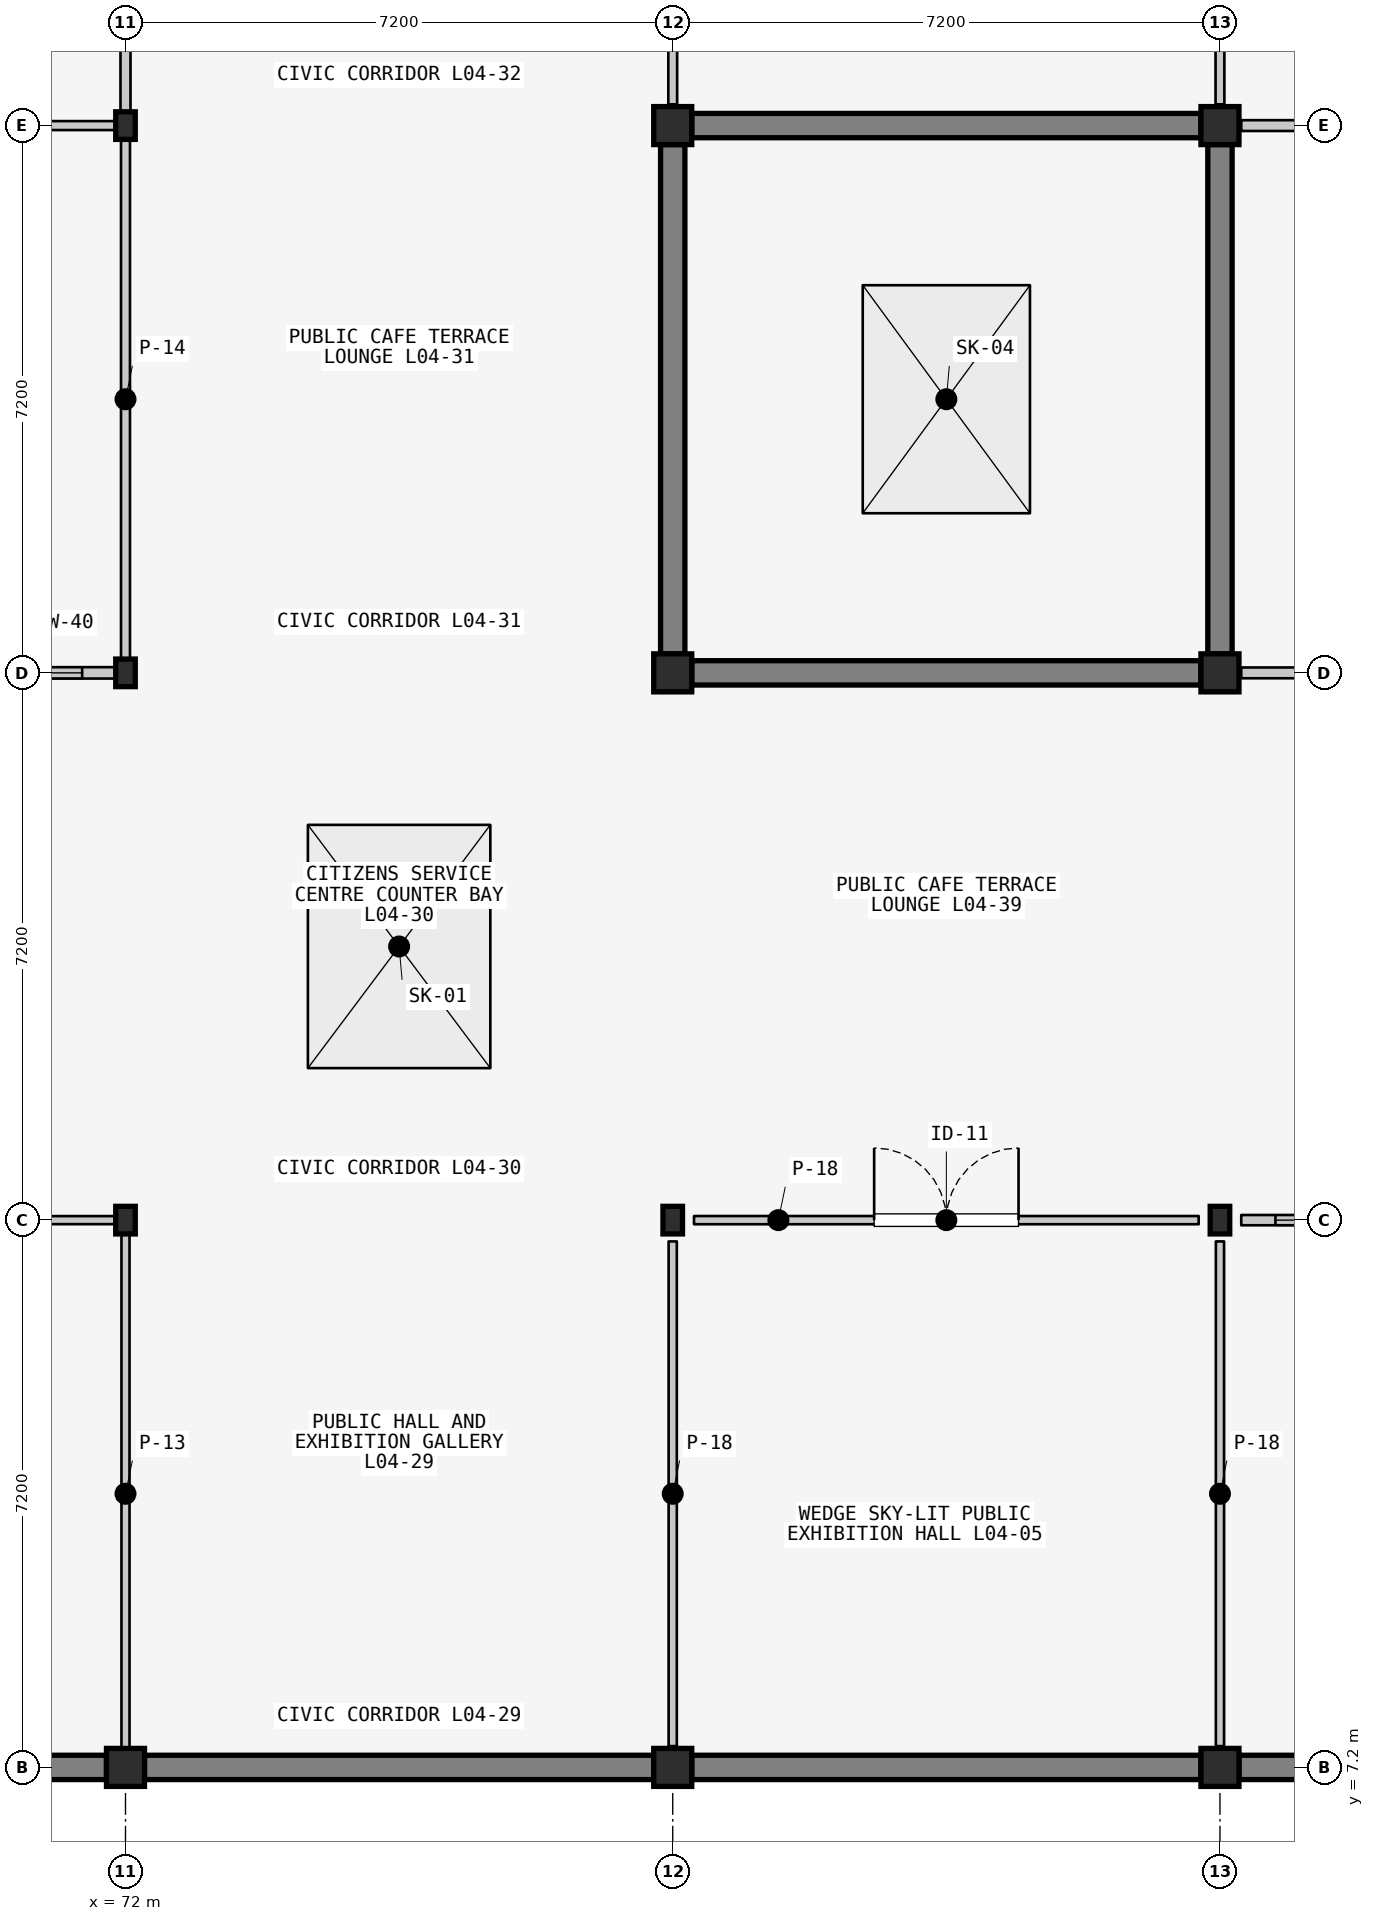
"""IFC4 building model, lengths in metres.
Left out: names, types, materials, properties, quantities, classifications, styles, units other than length and angle.
Written with IfcOpenShell. Run it as: python <this file> out.ifc"""

import sys

from ifc_helpers import new_model, si_unit, direction, frame, frame_2d, origin, origin_2d, place, context, subcontext, project, spatial, rectangle, i_section, extrude, element, fill, save


model = new_model("IFC4")
c1 = context("Model", 3, precision=1e-05, world=origin(), true_north=direction((0.0, 1.0)))
c2 = subcontext(c1, "Body", "Model", "MODEL_VIEW")
j1 = project(units=[si_unit("LENGTHUNIT", "METRE"), si_unit("PLANEANGLEUNIT", "RADIAN")], contexts=[c1])
p1 = place(None, origin())
s1 = spatial("IfcSite", under=j1, at=p1, CompositionType="ELEMENT")
p2 = place(p1, origin())
s2 = spatial("IfcBuilding", under=s1, at=p2, CompositionType="ELEMENT")
p3 = place(p2, frame((0.0, 0.0, 14.1)))
s3 = spatial("IfcBuildingStorey", under=s2, at=p3, CompositionType="ELEMENT", Elevation=14.1)
p4 = place(p3, frame((72.0, 7.2, 0.0), z_axis=(0.0, 0.0, 1.0), x_axis=(1.0, 0.0, 0.0)))
e1 = element("IfcColumn", 1, at=p4, inside=s3, PredefinedType="COLUMN", context=c2, shape_type="SweptSolid", body=[
    extrude(rectangle(XDim=0.5, YDim=0.5, at=origin_2d()), origin(), (0.0, 0.0, 1.0), 4.905),
])
p5 = place(p3, frame((72.0, 14.4, 0.0), z_axis=(0.0, 0.0, 1.0), x_axis=(1.0, 0.0, 0.0)))
e2 = element("IfcColumn", 2, at=p5, inside=s3, PredefinedType="COLUMN", context=c2, shape_type="SweptSolid", body=[
    extrude(i_section(OverallWidth=0.257, OverallDepth=0.363, WebThickness=0.013, FlangeThickness=0.022, FilletRadius=0.015, at=origin_2d()), origin(), (0.0, 0.0, 1.0), 6.248),
])
p6 = place(p3, frame((72.0, 21.6, 0.0), z_axis=(0.0, 0.0, 1.0), x_axis=(1.0, 0.0, 0.0)))
e3 = element("IfcColumn", 3, at=p6, inside=s3, PredefinedType="COLUMN", context=c2, shape_type="SweptSolid", body=[
    extrude(i_section(OverallWidth=0.257, OverallDepth=0.363, WebThickness=0.013, FlangeThickness=0.022, FilletRadius=0.015, at=origin_2d()), origin(), (0.0, 0.0, 1.0), 7.59),
])
p7 = place(p3, frame((72.0, 28.8, 0.0), z_axis=(0.0, 0.0, 1.0), x_axis=(1.0, 0.0, 0.0)))
e4 = element("IfcColumn", 4, at=p7, inside=s3, PredefinedType="COLUMN", context=c2, shape_type="SweptSolid", body=[
    extrude(i_section(OverallWidth=0.257, OverallDepth=0.363, WebThickness=0.013, FlangeThickness=0.022, FilletRadius=0.015, at=origin_2d()), origin(), (0.0, 0.0, 1.0), 8.933),
])
p8 = place(p3, frame((79.2, 7.2, 0.0), z_axis=(0.0, 0.0, 1.0), x_axis=(1.0, 0.0, 0.0)))
e5 = element("IfcColumn", 5, at=p8, inside=s3, PredefinedType="COLUMN", context=c2, shape_type="SweptSolid", body=[
    extrude(rectangle(XDim=0.5, YDim=0.5, at=origin_2d()), origin(), (0.0, 0.0, 1.0), 4.933),
])
p9 = place(p3, frame((79.2, 14.4, 0.0), z_axis=(0.0, 0.0, 1.0), x_axis=(1.0, 0.0, 0.0)))
e6 = element("IfcColumn", 6, at=p9, inside=s3, PredefinedType="COLUMN", context=c2, shape_type="SweptSolid", body=[
    extrude(i_section(OverallWidth=0.257, OverallDepth=0.363, WebThickness=0.013, FlangeThickness=0.022, FilletRadius=0.015, at=origin_2d()), origin(), (0.0, 0.0, 1.0), 6.276),
])
p10 = place(p3, frame((79.2, 21.6, 0.0), z_axis=(0.0, 0.0, 1.0), x_axis=(1.0, 0.0, 0.0)))
e7 = element("IfcColumn", 7, at=p10, inside=s3, PredefinedType="COLUMN", context=c2, shape_type="SweptSolid", body=[
    extrude(rectangle(XDim=0.5, YDim=0.5, at=origin_2d()), origin(), (0.0, 0.0, 1.0), 7.619),
])
p11 = place(p3, frame((79.2, 28.8, 0.0), z_axis=(0.0, 0.0, 1.0), x_axis=(1.0, 0.0, 0.0)))
e8 = element("IfcColumn", 8, at=p11, inside=s3, PredefinedType="COLUMN", context=c2, shape_type="SweptSolid", body=[
    extrude(rectangle(XDim=0.5, YDim=0.5, at=origin_2d()), origin(), (0.0, 0.0, 1.0), 8.962),
])
p12 = place(p3, frame((86.4, 7.2, 0.0), z_axis=(0.0, 0.0, 1.0), x_axis=(1.0, 0.0, 0.0)))
e9 = element("IfcColumn", 9, at=p12, inside=s3, PredefinedType="COLUMN", context=c2, shape_type="SweptSolid", body=[
    extrude(rectangle(XDim=0.5, YDim=0.5, at=origin_2d()), origin(), (0.0, 0.0, 1.0), 4.962),
])
p13 = place(p3, frame((86.4, 14.4, 0.0), z_axis=(0.0, 0.0, 1.0), x_axis=(1.0, 0.0, 0.0)))
e10 = element("IfcColumn", 10, at=p13, inside=s3, PredefinedType="COLUMN", context=c2, shape_type="SweptSolid", body=[
    extrude(i_section(OverallWidth=0.257, OverallDepth=0.363, WebThickness=0.013, FlangeThickness=0.022, FilletRadius=0.015, at=origin_2d()), origin(), (0.0, 0.0, 1.0), 6.305),
])
p14 = place(p3, frame((86.4, 21.6, 0.0), z_axis=(0.0, 0.0, 1.0), x_axis=(1.0, 0.0, 0.0)))
e11 = element("IfcColumn", 11, at=p14, inside=s3, PredefinedType="COLUMN", context=c2, shape_type="SweptSolid", body=[
    extrude(rectangle(XDim=0.5, YDim=0.5, at=origin_2d()), origin(), (0.0, 0.0, 1.0), 7.647),
])
p15 = place(p3, frame((86.4, 28.8, 0.0), z_axis=(0.0, 0.0, 1.0), x_axis=(1.0, 0.0, 0.0)))
e12 = element("IfcColumn", 12, at=p15, inside=s3, PredefinedType="COLUMN", context=c2, shape_type="SweptSolid", body=[
    extrude(rectangle(XDim=0.5, YDim=0.5, at=origin_2d()), origin(), (0.0, 0.0, 1.0), 8.99),
])
p16 = place(p3, frame((71.75, 7.2, 0.0), z_axis=(0.0, 0.0, 1.0), x_axis=(-1.0, 0.0, 0.0)))
e13 = element("IfcWall", 13, at=p16, inside=s3, PredefinedType="SOLIDWALL", context=c2, shape_type="SweptSolid", body=[
    extrude(rectangle(XDim=6.7, YDim=0.32, at=frame_2d((3.35, 0.0))), origin(), (0.0, 0.0, 1.0), 4.149),
])
p17 = place(p3, frame((78.95, 7.2, 0.0), z_axis=(0.0, 0.0, 1.0), x_axis=(-1.0, 0.0, 0.0)))
e14 = element("IfcWall", 14, at=p17, inside=s3, PredefinedType="SOLIDWALL", context=c2, shape_type="SweptSolid", body=[
    extrude(rectangle(XDim=6.7, YDim=0.32, at=frame_2d((3.35, 0.0))), origin(), (0.0, 0.0, 1.0), 4.177),
])
p18 = place(p3, frame((79.2, 28.55, 0.0), z_axis=(0.0, 0.0, 1.0), x_axis=(0.0, -1.0, 0.0)))
e15 = element("IfcWall", 15, at=p18, inside=s3, PredefinedType="SOLIDWALL", context=c2, shape_type="SweptSolid", body=[
    extrude(rectangle(XDim=6.7, YDim=0.32, at=frame_2d((3.35, 0.0))), origin(), (0.0, 0.0, 1.0), 6.936),
])
p19 = place(p3, frame((86.15, 7.2, 0.0), z_axis=(0.0, 0.0, 1.0), x_axis=(-1.0, 0.0, 0.0)))
e16 = element("IfcWall", 16, at=p19, inside=s3, PredefinedType="SOLIDWALL", context=c2, shape_type="SweptSolid", body=[
    extrude(rectangle(XDim=6.7, YDim=0.32, at=frame_2d((3.35, 0.0))), origin(), (0.0, 0.0, 1.0), 4.206),
])
p20 = place(p3, frame((79.45, 21.6, 0.0), z_axis=(0.0, 0.0, 1.0), x_axis=(1.0, 0.0, 0.0)))
e17 = element("IfcWall", 17, at=p20, inside=s3, PredefinedType="SOLIDWALL", context=c2, shape_type="SweptSolid", body=[
    extrude(rectangle(XDim=6.7, YDim=0.32, at=frame_2d((3.35, 0.0))), origin(), (0.0, 0.0, 1.0), 6.892),
])
p21 = place(p3, frame((86.15, 28.8, 0.0), z_axis=(0.0, 0.0, 1.0), x_axis=(-1.0, 0.0, 0.0)))
e18 = element("IfcWall", 18, at=p21, inside=s3, PredefinedType="SOLIDWALL", context=c2, shape_type="SweptSolid", body=[
    extrude(rectangle(XDim=6.7, YDim=0.32, at=frame_2d((3.35, 0.0))), origin(), (0.0, 0.0, 1.0), 8.235),
])
p22 = place(p3, frame((93.35, 7.2, 0.0), z_axis=(0.0, 0.0, 1.0), x_axis=(-1.0, 0.0, 0.0)))
e19 = element("IfcWall", 19, at=p22, inside=s3, PredefinedType="SOLIDWALL", context=c2, shape_type="SweptSolid", body=[
    extrude(rectangle(XDim=6.7, YDim=0.32, at=frame_2d((3.35, 0.0))), origin(), (0.0, 0.0, 1.0), 4.235),
])
p23 = place(p22, frame((0.908, 0.0, 0.95)))
e20 = element("IfcOpeningElement", 20, at=p23, cuts=e19, PredefinedType="OPENING", context=c2, shape_type="SweptSolid", body=[
    extrude(rectangle(XDim=1.4, YDim=2.1, at=frame_2d((0.7, 1.05))), frame((0.0, 0.17, 0.0), z_axis=(0.0, -1.0, 0.0), x_axis=(1.0, 0.0, 0.0)), (0.0, 0.0, 1.0), 0.34),
])
p24 = place(p22, frame((4.392, 0.0, 0.95)))
e21 = element("IfcOpeningElement", 21, at=p24, cuts=e19, PredefinedType="OPENING", context=c2, shape_type="SweptSolid", body=[
    extrude(rectangle(XDim=1.4, YDim=2.1, at=frame_2d((0.7, 1.05))), frame((0.0, 0.17, 0.0), z_axis=(0.0, -1.0, 0.0), x_axis=(1.0, 0.0, 0.0)), (0.0, 0.0, 1.0), 0.34),
])
p25 = place(p3, frame((86.4, 21.85, 0.0), z_axis=(0.0, 0.0, 1.0), x_axis=(0.0, 1.0, 0.0)))
e22 = element("IfcWall", 22, at=p25, inside=s3, PredefinedType="SOLIDWALL", context=c2, shape_type="SweptSolid", body=[
    extrude(rectangle(XDim=6.7, YDim=0.32, at=frame_2d((3.35, 0.0))), origin(), (0.0, 0.0, 1.0), 6.965),
])
p26 = place(p3, frame((64.92, 14.4, 0.0), z_axis=(0.0, 0.0, 1.0), x_axis=(1.0, 0.0, 0.0)))
e23 = element("IfcWall", 23, at=p26, inside=s3, PredefinedType="PARTITIONING", context=c2, shape_type="SweptSolid", body=[
    extrude(rectangle(XDim=6.96, YDim=0.106, at=frame_2d((3.48, 0.0))), origin(), (0.0, 0.0, 1.0), 3.72),
])
p27 = place(p26, frame((2.53, 0.0, 0.0)))
e24 = element("IfcOpeningElement", 24, at=p27, cuts=e23, PredefinedType="OPENING", context=c2, shape_type="SweptSolid", body=[
    extrude(rectangle(XDim=1.9, YDim=2.45, at=frame_2d((0.95, 1.225))), frame((0.0, 0.063, 0.0), z_axis=(0.0, -1.0, 0.0), x_axis=(1.0, 0.0, 0.0)), (0.0, 0.0, 1.0), 0.126),
])
p28 = place(p26, frame((0.45, 0.0, 1.05)))
e25 = element("IfcOpeningElement", 25, at=p28, cuts=e23, PredefinedType="OPENING", context=c2, shape_type="SweptSolid", body=[
    extrude(rectangle(XDim=1.36, YDim=1.1, at=frame_2d((0.68, 0.55))), frame((0.0, 0.063, 0.0), z_axis=(0.0, -1.0, 0.0), x_axis=(1.0, 0.0, 0.0)), (0.0, 0.0, 1.0), 0.126),
])
p29 = place(p3, frame((72.0, 14.28, 0.0), z_axis=(0.0, 0.0, 1.0), x_axis=(0.0, -1.0, 0.0)))
e26 = element("IfcWall", 26, at=p29, inside=s3, PredefinedType="PARTITIONING", context=c2, shape_type="SweptSolid", body=[
    extrude(rectangle(XDim=6.96, YDim=0.106, at=frame_2d((3.48, 0.0))), origin(), (0.0, 0.0, 1.0), 3.72),
])
p30 = place(p3, frame((71.88, 21.6, 0.0), z_axis=(0.0, 0.0, 1.0), x_axis=(-1.0, 0.0, 0.0)))
e27 = element("IfcWall", 27, at=p30, inside=s3, PredefinedType="PARTITIONING", context=c2, shape_type="SweptSolid", body=[
    extrude(rectangle(XDim=6.96, YDim=0.15, at=frame_2d((3.48, 0.0))), origin(), (0.0, 0.0, 1.0), 3.72),
])
p31 = place(p30, frame((2.655, 0.0, 0.0)))
e28 = element("IfcOpeningElement", 28, at=p31, cuts=e27, PredefinedType="OPENING", context=c2, shape_type="SweptSolid", body=[
    extrude(rectangle(XDim=1.65, YDim=2.35, at=frame_2d((0.825, 1.175))), frame((0.0, 0.085, 0.0), z_axis=(0.0, -1.0, 0.0), x_axis=(1.0, 0.0, 0.0)), (0.0, 0.0, 1.0), 0.17),
])
p32 = place(p30, frame((0.45, 0.0, 1.05)))
e29 = element("IfcOpeningElement", 29, at=p32, cuts=e27, PredefinedType="OPENING", context=c2, shape_type="SweptSolid", body=[
    extrude(rectangle(XDim=1.48, YDim=1.34, at=frame_2d((0.74, 0.67))), frame((0.0, 0.085, 0.0), z_axis=(0.0, -1.0, 0.0), x_axis=(1.0, 0.0, 0.0)), (0.0, 0.0, 1.0), 0.17),
])
for number, where, z_axis, x_axis in (
    (30, (64.92, 28.8, 0.0), (0.0, 0.0, 1.0), (1.0, 0.0, 0.0)),
    (31, (72.0, 28.68, 0.0), (0.0, 0.0, 1.0), (0.0, -1.0, 0.0)),
):
    element("IfcWall", number, at=place(p3, frame(where, z_axis=z_axis, x_axis=x_axis)), inside=s3, PredefinedType="PARTITIONING", context=c2, shape_type="SweptSolid", body=[
        extrude(rectangle(XDim=6.96, YDim=0.118, at=frame_2d((3.48, 0.0))), origin(), (0.0, 0.0, 1.0), 3.72),
    ])
p33 = place(p3, frame((72.0, 35.88, 0.0), z_axis=(0.0, 0.0, 1.0), x_axis=(0.0, -1.0, 0.0)))
e32 = element("IfcWall", 32, at=p33, inside=s3, PredefinedType="PARTITIONING", context=c2, shape_type="SweptSolid", body=[
    extrude(rectangle(XDim=6.96, YDim=0.132, at=frame_2d((3.48, 0.0))), origin(), (0.0, 0.0, 1.0), 3.72),
])
p34 = place(p33, frame((2.705, 0.0, 0.0)))
e33 = element("IfcOpeningElement", 33, at=p34, cuts=e32, PredefinedType="OPENING", context=c2, shape_type="SweptSolid", body=[
    extrude(rectangle(XDim=1.55, YDim=2.3, at=frame_2d((0.775, 1.15))), frame((0.0, 0.076, 0.0), z_axis=(0.0, -1.0, 0.0), x_axis=(1.0, 0.0, 0.0)), (0.0, 0.0, 1.0), 0.152),
])
p35 = place(p33, frame((0.45, 0.0, 1.05)))
e34 = element("IfcOpeningElement", 34, at=p35, cuts=e32, PredefinedType="OPENING", context=c2, shape_type="SweptSolid", body=[
    extrude(rectangle(XDim=1.58, YDim=1.34, at=frame_2d((0.79, 0.67))), frame((0.0, 0.076, 0.0), z_axis=(0.0, -1.0, 0.0), x_axis=(1.0, 0.0, 0.0)), (0.0, 0.0, 1.0), 0.152),
])
p36 = place(p3, frame((79.48, 14.4, 0.0), z_axis=(0.0, 0.0, 1.0), x_axis=(1.0, 0.0, 0.0)))
e35 = element("IfcWall", 35, at=p36, inside=s3, PredefinedType="PARTITIONING", context=c2, shape_type="SweptSolid", body=[
    extrude(rectangle(XDim=6.64, YDim=0.108, at=frame_2d((3.32, 0.0))), origin(), (0.0, 0.0, 1.0), 3.72),
])
p37 = place(p36, frame((2.37, 0.0, 0.0)))
e36 = element("IfcOpeningElement", 36, at=p37, cuts=e35, PredefinedType="OPENING", context=c2, shape_type="SweptSolid", body=[
    extrude(rectangle(XDim=1.9, YDim=2.45, at=frame_2d((0.95, 1.225))), frame((0.0, 0.064, 0.0), z_axis=(0.0, -1.0, 0.0), x_axis=(1.0, 0.0, 0.0)), (0.0, 0.0, 1.0), 0.128),
])
for number, where, z_axis, x_axis in (
    (37, (79.2, 7.48, 0.0), (0.0, 0.0, 1.0), (0.0, 1.0, 0.0)),
    (38, (86.4, 14.12, 0.0), (0.0, 0.0, 1.0), (0.0, -1.0, 0.0)),
):
    element("IfcWall", number, at=place(p3, frame(where, z_axis=z_axis, x_axis=x_axis)), inside=s3, PredefinedType="PARTITIONING", context=c2, shape_type="SweptSolid", body=[
        extrude(rectangle(XDim=6.64, YDim=0.108, at=frame_2d((3.32, 0.0))), origin(), (0.0, 0.0, 1.0), 3.72),
    ])
p38 = place(p3, frame((79.2, 29.08, 0.0), z_axis=(0.0, 0.0, 1.0), x_axis=(0.0, 1.0, 0.0)))
e39 = element("IfcWall", 39, at=p38, inside=s3, PredefinedType="PARTITIONING", context=c2, shape_type="SweptSolid", body=[
    extrude(rectangle(XDim=6.8, YDim=0.116, at=frame_2d((3.4, 0.0))), origin(), (0.0, 0.0, 1.0), 3.72),
])
p39 = place(p38, frame((2.5, 0.0, 0.0)))
e40 = element("IfcOpeningElement", 40, at=p39, cuts=e39, PredefinedType="OPENING", context=c2, shape_type="SweptSolid", body=[
    extrude(rectangle(XDim=1.8, YDim=2.4, at=frame_2d((0.9, 1.2))), frame((0.0, 0.068, 0.0), z_axis=(0.0, -1.0, 0.0), x_axis=(1.0, 0.0, 0.0)), (0.0, 0.0, 1.0), 0.136),
])
p40 = place(p3, frame((86.4, 35.88, 0.0), z_axis=(0.0, 0.0, 1.0), x_axis=(0.0, -1.0, 0.0)))
e41 = element("IfcWall", 41, at=p40, inside=s3, PredefinedType="PARTITIONING", context=c2, shape_type="SweptSolid", body=[
    extrude(rectangle(XDim=6.8, YDim=0.116, at=frame_2d((3.4, 0.0))), origin(), (0.0, 0.0, 1.0), 3.72),
])
p41 = place(p3, frame((86.68, 14.4, 0.0), z_axis=(0.0, 0.0, 1.0), x_axis=(1.0, 0.0, 0.0)))
e42 = element("IfcWall", 42, at=p41, inside=s3, PredefinedType="PARTITIONING", context=c2, shape_type="SweptSolid", body=[
    extrude(rectangle(XDim=6.64, YDim=0.135, at=frame_2d((3.32, 0.0))), origin(), (0.0, 0.0, 1.0), 3.72),
])
p42 = place(p41, frame((2.37, 0.0, 0.0)))
e43 = element("IfcOpeningElement", 43, at=p42, cuts=e42, PredefinedType="OPENING", context=c2, shape_type="SweptSolid", body=[
    extrude(rectangle(XDim=1.9, YDim=2.45, at=frame_2d((0.95, 1.225))), frame((0.0, 0.077, 0.0), z_axis=(0.0, -1.0, 0.0), x_axis=(1.0, 0.0, 0.0)), (0.0, 0.0, 1.0), 0.155),
])
p43 = place(p41, frame((0.45, 0.0, 1.05)))
e44 = element("IfcOpeningElement", 44, at=p43, cuts=e42, PredefinedType="OPENING", context=c2, shape_type="SweptSolid", body=[
    extrude(rectangle(XDim=1.38, YDim=1.44, at=frame_2d((0.69, 0.72))), frame((0.0, 0.077, 0.0), z_axis=(0.0, -1.0, 0.0), x_axis=(1.0, 0.0, 0.0)), (0.0, 0.0, 1.0), 0.155),
])
p44 = place(p3, frame((93.32, 21.6, 0.0), z_axis=(0.0, 0.0, 1.0), x_axis=(-1.0, 0.0, 0.0)))
e45 = element("IfcWall", 45, at=p44, inside=s3, PredefinedType="PARTITIONING", context=c2, shape_type="SweptSolid", body=[
    extrude(rectangle(XDim=6.64, YDim=0.142, at=frame_2d((3.32, 0.0))), origin(), (0.0, 0.0, 1.0), 3.72),
])
p45 = place(p44, frame((2.42, 0.0, 0.0)))
e46 = element("IfcOpeningElement", 46, at=p45, cuts=e45, PredefinedType="OPENING", context=c2, shape_type="SweptSolid", body=[
    extrude(rectangle(XDim=1.8, YDim=2.4, at=frame_2d((0.9, 1.2))), frame((0.0, 0.081, 0.0), z_axis=(0.0, -1.0, 0.0), x_axis=(1.0, 0.0, 0.0)), (0.0, 0.0, 1.0), 0.162),
])
p46 = place(p44, frame((0.45, 0.0, 1.05)))
e47 = element("IfcOpeningElement", 47, at=p46, cuts=e45, PredefinedType="OPENING", context=c2, shape_type="SweptSolid", body=[
    extrude(rectangle(XDim=1.48, YDim=1.48, at=frame_2d((0.74, 0.74))), frame((0.0, 0.081, 0.0), z_axis=(0.0, -1.0, 0.0), x_axis=(1.0, 0.0, 0.0)), (0.0, 0.0, 1.0), 0.162),
])
p47 = place(p3, frame((86.68, 28.8, 0.0), z_axis=(0.0, 0.0, 1.0), x_axis=(1.0, 0.0, 0.0)))
e48 = element("IfcWall", 48, at=p47, inside=s3, PredefinedType="PARTITIONING", context=c2, shape_type="SweptSolid", body=[
    extrude(rectangle(XDim=6.64, YDim=0.142, at=frame_2d((3.32, 0.0))), origin(), (0.0, 0.0, 1.0), 3.72),
])
p48 = place(p3, frame((64.8, 7.2, 5.1), z_axis=(-0.003900009496, -0.183347177316, 0.983040488737), x_axis=(0.999992130387, 0.0, 0.003967261622)))
p49 = place(p48, frame((10.808, 10.986, 0.0)))
p50 = place(p49, origin())
e49 = element("IfcWindow", 49, at=p50, inside=s3, PartitioningType="SINGLE_PANEL", PredefinedType="SKYLIGHT", context=c2, shape_type="SweptSolid", body=[
    extrude(rectangle(XDim=2.4, YDim=3.2, at=origin_2d()), origin(), (0.0, 0.0, -1.0), 0.06),
])
p51 = place(p48, frame((18.013, 18.31, 0.0)))
p52 = place(p51, origin())
e50 = element("IfcWindow", 50, at=p52, inside=s3, PartitioningType="SINGLE_PANEL", PredefinedType="SKYLIGHT", context=c2, shape_type="SweptSolid", body=[
    extrude(rectangle(XDim=2.2, YDim=3.0, at=origin_2d()), origin(), (0.0, 0.0, -1.0), 0.06),
])
p53 = place(p32, origin())
e51 = element("IfcWindow", 51, at=p53, inside=s3, PartitioningType="SINGLE_PANEL", PredefinedType="WINDOW", context=c2, shape_type="SweptSolid", body=[
    extrude(rectangle(XDim=1.48, YDim=1.34, at=frame_2d((0.74, 0.67))), frame((0.0, 0.03, 0.0), z_axis=(0.0, -1.0, 0.0), x_axis=(1.0, 0.0, 0.0)), (0.0, 0.0, 1.0), 0.06),
])
fill(e29, e51)
p54 = place(p37, origin())
e52 = element("IfcDoor", 52, at=p54, inside=s3, OperationType="DOUBLE_DOOR_SINGLE_SWING", PredefinedType="DOOR", context=c2, shape_type="SweptSolid", body=[
    extrude(rectangle(XDim=1.9, YDim=2.45, at=frame_2d((0.95, 1.225))), frame((0.0, 0.025, 0.0), z_axis=(0.0, -1.0, 0.0), x_axis=(1.0, 0.0, 0.0)), (0.0, 0.0, 1.0), 0.05),
])
fill(e36, e52)
p55 = place(p43, origin())
e53 = element("IfcWindow", 53, at=p55, inside=s3, PartitioningType="SINGLE_PANEL", PredefinedType="WINDOW", context=c2, shape_type="SweptSolid", body=[
    extrude(rectangle(XDim=1.38, YDim=1.44, at=frame_2d((0.69, 0.72))), frame((0.0, 0.03, 0.0), z_axis=(0.0, -1.0, 0.0), x_axis=(1.0, 0.0, 0.0)), (0.0, 0.0, 1.0), 0.06),
])
fill(e44, e53)
save(model, sys.argv[1])
